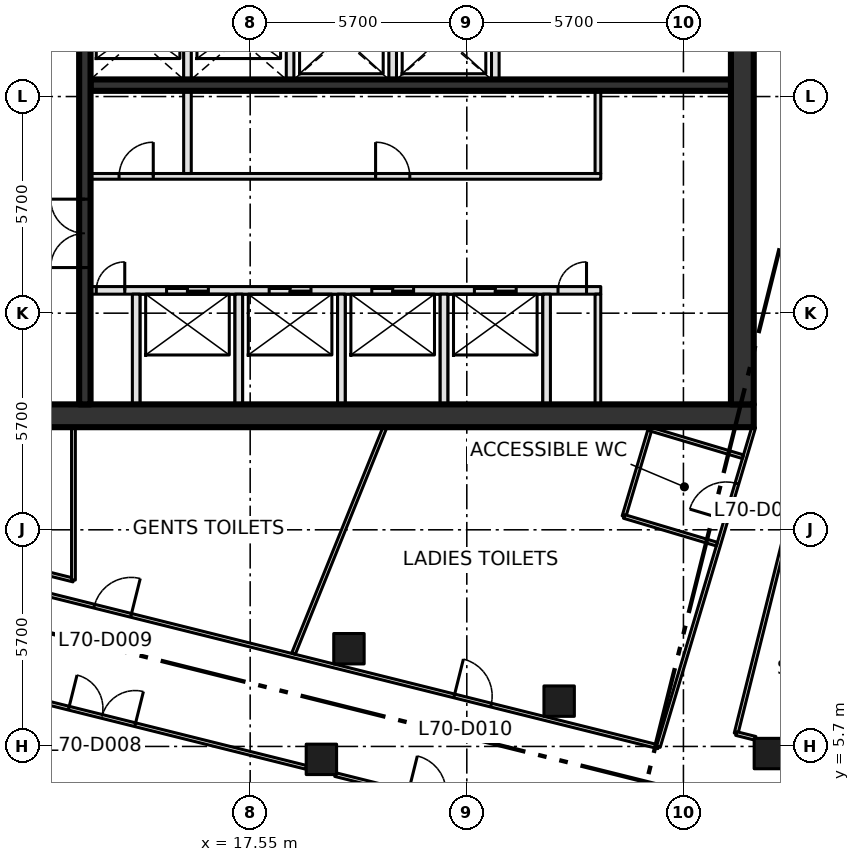
"""IFC4 building model, lengths in metres.
Left out: names, types, materials, properties, quantities, classifications, styles, units other than length and angle.
Written with IfcOpenShell. Run it as: python <this file> out.ifc"""

import sys

from ifc_helpers import new_model, si_unit, direction, frame, frame_2d, origin, origin_2d, place, context, subcontext, project, spatial, rectangle, extrude, element, fill, save


model = new_model("IFC4")
c1 = context("Model", 3, precision=1e-05, world=origin(), true_north=direction((0.0, 1.0)))
c2 = subcontext(c1, "Body", "Model", "MODEL_VIEW")
j1 = project(units=[si_unit("LENGTHUNIT", "METRE"), si_unit("PLANEANGLEUNIT", "RADIAN")], contexts=[c1])
p1 = place(None, origin())
s1 = spatial("IfcSite", under=j1, at=p1, CompositionType="ELEMENT")
p2 = place(p1, origin())
s2 = spatial("IfcBuilding", under=s1, at=p2, CompositionType="ELEMENT")
p3 = place(p2, frame((0.0, 0.0, 306.6)))
s3 = spatial("IfcBuildingStorey", under=s2, at=p3, CompositionType="ELEMENT", Elevation=306.6)
for number, where, z_axis, x_axis in (
    (1, (19.424, 5.36, 0.0), (0.0, 0.0, 1.0), (1.0, 0.0, 0.0)),
    (2, (20.149, 8.271, 0.0), (0.0, 0.0, 1.0), (1.0, 0.0, 0.0)),
    (3, (25.68, 6.892, 0.0), (0.0, 0.0, 1.0), (1.0, 0.0, 0.0)),
    (4, (31.211, 5.513, 0.0), (0.0, 0.0, 1.0), (1.0, 0.0, 0.0)),
):
    element("IfcColumn", number, at=place(p3, frame(where, z_axis=z_axis, x_axis=x_axis)), inside=s3, PredefinedType="COLUMN", context=c2, shape_type="SweptSolid", body=[
        extrude(rectangle(XDim=0.8, YDim=0.8, at=origin_2d()), origin(), (0.0, 0.0, 1.0), 4.2),
    ])
p4 = place(p3, frame((8.0, 14.4, -0.3), z_axis=(0.0, 0.0, 1.0), x_axis=(1.0, 0.0, 0.0)))
e5 = element("IfcWall", 5, at=p4, inside=s3, PredefinedType="SHEAR", context=c2, shape_type="SweptSolid", body=[
    extrude(rectangle(XDim=22.8, YDim=0.6, at=frame_2d((11.4, 0.0))), origin(), (0.0, 0.0, 1.0), 4.2),
])
p5 = place(p4, frame((2.3, 0.0, 0.3)))
e6 = element("IfcOpeningElement", 6, at=p5, cuts=e5, PredefinedType="OPENING", context=c2, shape_type="SweptSolid", body=[
    extrude(rectangle(XDim=1.8, YDim=2.1, at=frame_2d((0.9, 1.05))), frame((0.0, 0.31, 0.0), z_axis=(0.0, -1.0, 0.0), x_axis=(1.0, 0.0, 0.0)), (0.0, 0.0, 1.0), 0.62),
])
p6 = place(p3, frame((30.5, 14.7, -0.3), z_axis=(0.0, 0.0, 1.0), x_axis=(0.0, 1.0, 0.0)))
e7 = element("IfcWall", 7, at=p6, inside=s3, PredefinedType="SHEAR", context=c2, shape_type="SweptSolid", body=[
    extrude(rectangle(XDim=21.0, YDim=0.6, at=frame_2d((10.5, 0.0))), origin(), (0.0, 0.0, 1.0), 4.2),
])
p7 = place(p3, frame((13.35, 17.7, 0.0), z_axis=(0.0, 0.0, 1.0), x_axis=(1.0, 0.0, 0.0)))
e8 = element("IfcWall", 8, at=p7, inside=s3, PredefinedType="SOLIDWALL", context=c2, shape_type="SweptSolid", body=[
    extrude(rectangle(XDim=13.425, YDim=0.2, at=frame_2d((6.712, 0.0))), origin(), (0.0, 0.0, 1.0), 3.9),
])
p8 = place(p7, frame((2.0, 0.0, 0.0)))
e9 = element("IfcOpeningElement", 9, at=p8, cuts=e8, PredefinedType="OPENING", context=c2, shape_type="SweptSolid", body=[
    extrude(rectangle(XDim=1.1, YDim=2.1, at=frame_2d((0.55, 1.05))), frame((0.0, 0.11, 0.0), z_axis=(0.0, -1.0, 0.0), x_axis=(1.0, 0.0, 0.0)), (0.0, 0.0, 1.0), 0.22),
])
p9 = place(p7, frame((4.7, 0.0, 0.0)))
e10 = element("IfcOpeningElement", 10, at=p9, cuts=e8, PredefinedType="OPENING", context=c2, shape_type="SweptSolid", body=[
    extrude(rectangle(XDim=1.1, YDim=2.1, at=frame_2d((0.55, 1.05))), frame((0.0, 0.11, 0.0), z_axis=(0.0, -1.0, 0.0), x_axis=(1.0, 0.0, 0.0)), (0.0, 0.0, 1.0), 0.22),
])
p10 = place(p7, frame((7.4, 0.0, 0.0)))
e11 = element("IfcOpeningElement", 11, at=p10, cuts=e8, PredefinedType="OPENING", context=c2, shape_type="SweptSolid", body=[
    extrude(rectangle(XDim=1.1, YDim=2.1, at=frame_2d((0.55, 1.05))), frame((0.0, 0.11, 0.0), z_axis=(0.0, -1.0, 0.0), x_axis=(1.0, 0.0, 0.0)), (0.0, 0.0, 1.0), 0.22),
])
p11 = place(p7, frame((10.1, 0.0, 0.0)))
e12 = element("IfcOpeningElement", 12, at=p11, cuts=e8, PredefinedType="OPENING", context=c2, shape_type="SweptSolid", body=[
    extrude(rectangle(XDim=1.1, YDim=2.1, at=frame_2d((0.55, 1.05))), frame((0.0, 0.11, 0.0), z_axis=(0.0, -1.0, 0.0), x_axis=(1.0, 0.0, 0.0)), (0.0, 0.0, 1.0), 0.22),
])
p12 = place(p7, frame((0.15, 0.0, 0.0)))
e13 = element("IfcOpeningElement", 13, at=p12, cuts=e8, PredefinedType="OPENING", context=c2, shape_type="SweptSolid", body=[
    extrude(rectangle(XDim=0.75, YDim=2.1, at=frame_2d((0.375, 1.05))), frame((0.0, 0.11, 0.0), z_axis=(0.0, -1.0, 0.0), x_axis=(1.0, 0.0, 0.0)), (0.0, 0.0, 1.0), 0.22),
])
p13 = place(p7, frame((12.3, 0.0, 0.0)))
e14 = element("IfcOpeningElement", 14, at=p13, cuts=e8, PredefinedType="OPENING", context=c2, shape_type="SweptSolid", body=[
    extrude(rectangle(XDim=0.75, YDim=2.1, at=frame_2d((0.375, 1.05))), frame((0.0, 0.11, 0.0), z_axis=(0.0, -1.0, 0.0), x_axis=(1.0, 0.0, 0.0)), (0.0, 0.0, 1.0), 0.22),
])
p14 = place(p3, frame((13.35, 20.7, 0.0), z_axis=(0.0, 0.0, 1.0), x_axis=(1.0, 0.0, 0.0)))
e15 = element("IfcWall", 15, at=p14, inside=s3, PredefinedType="PARTITIONING", context=c2, shape_type="SweptSolid", body=[
    extrude(rectangle(XDim=13.425, YDim=0.15, at=frame_2d((6.712, 0.0))), origin(), (0.0, 0.0, 1.0), 3.9),
])
p15 = place(p14, frame((0.75, 0.0, 0.0)))
e16 = element("IfcOpeningElement", 16, at=p15, cuts=e15, PredefinedType="OPENING", context=c2, shape_type="SweptSolid", body=[
    extrude(rectangle(XDim=0.9, YDim=2.1, at=frame_2d((0.45, 1.05))), frame((0.0, 0.085, 0.0), z_axis=(0.0, -1.0, 0.0), x_axis=(1.0, 0.0, 0.0)), (0.0, 0.0, 1.0), 0.17),
])
p16 = place(p14, frame((7.5, 0.0, 0.0)))
e17 = element("IfcOpeningElement", 17, at=p16, cuts=e15, PredefinedType="OPENING", context=c2, shape_type="SweptSolid", body=[
    extrude(rectangle(XDim=0.9, YDim=2.1, at=frame_2d((0.45, 1.05))), frame((0.0, 0.085, 0.0), z_axis=(0.0, -1.0, 0.0), x_axis=(1.0, 0.0, 0.0)), (0.0, 0.0, 1.0), 0.17),
])
p17 = place(p3, frame((13.35, 23.1, 0.0), z_axis=(0.0, 0.0, 1.0), x_axis=(1.0, 0.0, 0.0)))
e18 = element("IfcWall", 18, at=p17, inside=s3, PredefinedType="SHEAR", context=c2, shape_type="SweptSolid", body=[
    extrude(rectangle(XDim=16.85, YDim=0.3, at=frame_2d((8.425, 0.0))), origin(), (0.0, 0.0, 1.0), 3.9),
])
p18 = place(p3, frame((13.2, 14.7, 0.0), z_axis=(0.0, 0.0, 1.0), x_axis=(0.0, 1.0, 0.0)))
e19 = element("IfcWall", 19, at=p18, inside=s3, PredefinedType="SHEAR", context=c2, shape_type="SweptSolid", body=[
    extrude(rectangle(XDim=21.0, YDim=0.3, at=frame_2d((10.5, 0.0))), origin(), (0.0, 0.0, 1.0), 3.9),
])
p19 = place(p18, frame((3.6, 0.0, 0.0)))
e20 = element("IfcOpeningElement", 20, at=p19, cuts=e19, PredefinedType="OPENING", context=c2, shape_type="SweptSolid", body=[
    extrude(rectangle(XDim=1.8, YDim=2.1, at=frame_2d((0.9, 1.05))), frame((0.0, 0.16, 0.0), z_axis=(0.0, -1.0, 0.0), x_axis=(1.0, 0.0, 0.0)), (0.0, 0.0, 1.0), 0.32),
])
p20 = place(p18, frame((11.7, 0.0, 0.0)))
e21 = element("IfcOpeningElement", 21, at=p20, cuts=e19, PredefinedType="OPENING", context=c2, shape_type="SweptSolid", body=[
    extrude(rectangle(XDim=1.2, YDim=2.1, at=frame_2d((0.6, 1.05))), frame((0.0, 0.16, 0.0), z_axis=(0.0, -1.0, 0.0), x_axis=(1.0, 0.0, 0.0)), (0.0, 0.0, 1.0), 0.32),
])
p21 = place(p3, frame((14.55, 14.7, 0.0), z_axis=(0.0, 0.0, 1.0), x_axis=(0.0, 1.0, 0.0)))
e22 = element("IfcWall", 22, at=p21, inside=s3, PredefinedType="SOLIDWALL", context=c2, shape_type="SweptSolid", body=[
    extrude(rectangle(XDim=2.9, YDim=0.2, at=frame_2d((1.45, 0.0))), origin(), (0.0, 0.0, 1.0), 3.9),
])
p22 = place(p3, frame((15.9, 20.775, 0.0), z_axis=(0.0, 0.0, 1.0), x_axis=(0.0, 1.0, 0.0)))
e23 = element("IfcWall", 23, at=p22, inside=s3, PredefinedType="SOLIDWALL", context=c2, shape_type="SweptSolid", body=[
    extrude(rectangle(XDim=4.625, YDim=0.2, at=frame_2d((2.312, 0.0))), origin(), (0.0, 0.0, 1.0), 3.9),
])
p23 = place(p3, frame((17.25, 14.7, 0.0), z_axis=(0.0, 0.0, 1.0), x_axis=(0.0, 1.0, 0.0)))
e24 = element("IfcWall", 24, at=p23, inside=s3, PredefinedType="SOLIDWALL", context=c2, shape_type="SweptSolid", body=[
    extrude(rectangle(XDim=2.9, YDim=0.2, at=frame_2d((1.45, 0.0))), origin(), (0.0, 0.0, 1.0), 3.9),
])
p24 = place(p3, frame((18.6, 23.25, 0.0), z_axis=(0.0, 0.0, 1.0), x_axis=(0.0, 1.0, 0.0)))
e25 = element("IfcWall", 25, at=p24, inside=s3, PredefinedType="SOLIDWALL", context=c2, shape_type="SweptSolid", body=[
    extrude(rectangle(XDim=5.15, YDim=0.2, at=frame_2d((2.575, 0.0))), origin(), (0.0, 0.0, 1.0), 3.9),
])
p25 = place(p24, frame((3.15, 0.0, 0.0)))
e26 = element("IfcOpeningElement", 26, at=p25, cuts=e25, PredefinedType="OPENING", context=c2, shape_type="SweptSolid", body=[
    extrude(rectangle(XDim=1.2, YDim=2.1, at=frame_2d((0.6, 1.05))), frame((0.0, 0.11, 0.0), z_axis=(0.0, -1.0, 0.0), x_axis=(1.0, 0.0, 0.0)), (0.0, 0.0, 1.0), 0.22),
])
p26 = place(p3, frame((19.95, 14.7, 0.0), z_axis=(0.0, 0.0, 1.0), x_axis=(0.0, 1.0, 0.0)))
e27 = element("IfcWall", 27, at=p26, inside=s3, PredefinedType="SOLIDWALL", context=c2, shape_type="SweptSolid", body=[
    extrude(rectangle(XDim=2.9, YDim=0.2, at=frame_2d((1.45, 0.0))), origin(), (0.0, 0.0, 1.0), 3.9),
])
p27 = place(p3, frame((21.3, 23.25, 0.0), z_axis=(0.0, 0.0, 1.0), x_axis=(0.0, 1.0, 0.0)))
e28 = element("IfcWall", 28, at=p27, inside=s3, PredefinedType="SOLIDWALL", context=c2, shape_type="SweptSolid", body=[
    extrude(rectangle(XDim=2.15, YDim=0.2, at=frame_2d((1.075, 0.0))), origin(), (0.0, 0.0, 1.0), 3.9),
])
p28 = place(p3, frame((22.65, 14.7, 0.0), z_axis=(0.0, 0.0, 1.0), x_axis=(0.0, 1.0, 0.0)))
e29 = element("IfcWall", 29, at=p28, inside=s3, PredefinedType="SOLIDWALL", context=c2, shape_type="SweptSolid", body=[
    extrude(rectangle(XDim=2.9, YDim=0.2, at=frame_2d((1.45, 0.0))), origin(), (0.0, 0.0, 1.0), 3.9),
])
p29 = place(p3, frame((24.0, 23.25, 0.0), z_axis=(0.0, 0.0, 1.0), x_axis=(0.0, 1.0, 0.0)))
e30 = element("IfcWall", 30, at=p29, inside=s3, PredefinedType="SOLIDWALL", context=c2, shape_type="SweptSolid", body=[
    extrude(rectangle(XDim=2.15, YDim=0.2, at=frame_2d((1.075, 0.0))), origin(), (0.0, 0.0, 1.0), 3.9),
])
p30 = place(p3, frame((25.35, 14.7, 0.0), z_axis=(0.0, 0.0, 1.0), x_axis=(0.0, 1.0, 0.0)))
e31 = element("IfcWall", 31, at=p30, inside=s3, PredefinedType="SOLIDWALL", context=c2, shape_type="SweptSolid", body=[
    extrude(rectangle(XDim=2.9, YDim=0.2, at=frame_2d((1.45, 0.0))), origin(), (0.0, 0.0, 1.0), 3.9),
])
p31 = place(p3, frame((26.7, 14.7, 0.0), z_axis=(0.0, 0.0, 1.0), x_axis=(0.0, 1.0, 0.0)))
e32 = element("IfcWall", 32, at=p31, inside=s3, PredefinedType="PARTITIONING", context=c2, shape_type="SweptSolid", body=[
    extrude(rectangle(XDim=2.9, YDim=0.15, at=frame_2d((1.45, 0.0))), origin(), (0.0, 0.0, 1.0), 3.9),
])
p32 = place(p3, frame((26.7, 20.775, 0.0), z_axis=(0.0, 0.0, 1.0), x_axis=(0.0, 1.0, 0.0)))
e33 = element("IfcWall", 33, at=p32, inside=s3, PredefinedType="PARTITIONING", context=c2, shape_type="SweptSolid", body=[
    extrude(rectangle(XDim=2.175, YDim=0.15, at=frame_2d((1.087, 0.0))), origin(), (0.0, 0.0, 1.0), 3.9),
])
p33 = place(p3, frame((8.333, 7.815, 0.0), z_axis=(0.0, 0.0, 1.0), x_axis=(0.970306508913, -0.241878644697, 0.0)))
e34 = element("IfcWall", 34, at=p33, inside=s3, PredefinedType="PARTITIONING", context=c2, shape_type="SweptSolid", body=[
    extrude(rectangle(XDim=11.018, YDim=0.1, at=frame_2d((5.509, 0.0))), origin(), (0.0, 0.0, 1.0), 3.9),
])
p34 = place(p33, frame((4.58, 0.0, 0.0)))
e35 = element("IfcOpeningElement", 35, at=p34, cuts=e34, PredefinedType="OPENING", context=c2, shape_type="SweptSolid", body=[
    extrude(rectangle(XDim=1.8, YDim=2.1, at=frame_2d((0.9, 1.05))), frame((0.0, 0.06, 0.0), z_axis=(0.0, -1.0, 0.0), x_axis=(1.0, 0.0, 0.0)), (0.0, 0.0, 1.0), 0.12),
])
p35 = place(p3, frame((9.002, 10.499, 0.0), z_axis=(0.0, 0.0, 1.0), x_axis=(0.970298340477, -0.241911410372, 0.0)))
e36 = element("IfcWall", 36, at=p35, inside=s3, PredefinedType="PARTITIONING", context=c2, shape_type="SweptSolid", body=[
    extrude(rectangle(XDim=19.88, YDim=0.1, at=frame_2d((9.94, 0.0))), origin(), (0.0, 0.0, 1.0), 3.9),
])
p36 = place(p35, frame((4.58, 0.0, 0.0)))
e37 = element("IfcOpeningElement", 37, at=p36, cuts=e36, PredefinedType="OPENING", context=c2, shape_type="SweptSolid", body=[
    extrude(rectangle(XDim=1.0, YDim=2.1, at=frame_2d((0.5, 1.05))), frame((0.0, 0.06, 0.0), z_axis=(0.0, -1.0, 0.0), x_axis=(1.0, 0.0, 0.0)), (0.0, 0.0, 1.0), 0.12),
])
p37 = place(p35, frame((14.343, 0.0, 0.0)))
e38 = element("IfcOpeningElement", 38, at=p37, cuts=e36, PredefinedType="OPENING", context=c2, shape_type="SweptSolid", body=[
    extrude(rectangle(XDim=1.0, YDim=2.1, at=frame_2d((0.5, 1.05))), frame((0.0, 0.06, 0.0), z_axis=(0.0, -1.0, 0.0), x_axis=(1.0, 0.0, 0.0)), (0.0, 0.0, 1.0), 0.12),
])
p38 = place(p3, frame((9.9, 10.826, 0.0), z_axis=(0.0, 0.0, 1.0), x_axis=(0.970290953223, -0.241941038466, 0.0)))
e39 = element("IfcWall", 39, at=p38, inside=s3, PredefinedType="PARTITIONING", context=c2, shape_type="SweptSolid", body=[
    extrude(rectangle(XDim=3.092, YDim=0.1, at=frame_2d((1.546, 0.0))), origin(), (0.0, 0.0, 1.0), 3.9),
])
p39 = place(p3, frame((12.9, 10.078, 0.0), z_axis=(0.0, 0.0, 1.0), x_axis=(0.0, 1.0, 0.0)))
e40 = element("IfcWall", 40, at=p39, inside=s3, PredefinedType="PARTITIONING", context=c2, shape_type="SweptSolid", body=[
    extrude(rectangle(XDim=4.022, YDim=0.1, at=frame_2d((2.011, 0.0))), origin(), (0.0, 0.0, 1.0), 3.9),
])
p40 = place(p3, frame((19.786, 4.96, 0.0), z_axis=(0.0, 0.0, 1.0), x_axis=(0.970335085454, -0.241763979817, 0.0)))
e41 = element("IfcWall", 41, at=p40, inside=s3, PredefinedType="PARTITIONING", context=c2, shape_type="SweptSolid", body=[
    extrude(rectangle(XDim=4.914, YDim=0.1, at=frame_2d((2.457, 0.0))), origin(), (0.0, 0.0, 1.0), 3.9),
])
p41 = place(p40, frame((1.98, 0.0, 0.0)))
e42 = element("IfcOpeningElement", 42, at=p41, cuts=e41, PredefinedType="OPENING", context=c2, shape_type="SweptSolid", body=[
    extrude(rectangle(XDim=1.0, YDim=2.1, at=frame_2d((0.5, 1.05))), frame((0.0, 0.06, 0.0), z_axis=(0.0, -1.0, 0.0), x_axis=(1.0, 0.0, 0.0)), (0.0, 0.0, 1.0), 0.12),
])
p42 = place(p3, frame((28.291, 5.69, 0.0), z_axis=(0.0, 0.0, 1.0), x_axis=(0.28588265334, 0.958264633867, 0.0)))
e43 = element("IfcWall", 43, at=p42, inside=s3, PredefinedType="PARTITIONING", context=c2, shape_type="SweptSolid", body=[
    extrude(rectangle(XDim=8.776, YDim=0.1, at=frame_2d((4.388, 0.0))), origin(), (0.0, 0.0, 1.0), 3.9),
])
p43 = place(p42, frame((6.23, 0.0, 0.0)))
e44 = element("IfcOpeningElement", 44, at=p43, cuts=e43, PredefinedType="OPENING", context=c2, shape_type="SweptSolid", body=[
    extrude(rectangle(XDim=1.0, YDim=2.1, at=frame_2d((0.5, 1.05))), frame((0.0, 0.06, 0.0), z_axis=(0.0, -1.0, 0.0), x_axis=(1.0, 0.0, 0.0)), (0.0, 0.0, 1.0), 0.12),
])
p44 = place(p3, frame((30.336, 6.04, 0.0), z_axis=(0.0, 0.0, 1.0), x_axis=(0.2420145387, 0.970272623059, 0.0)))
e45 = element("IfcWall", 45, at=p44, inside=s3, PredefinedType="PARTITIONING", context=c2, shape_type="SweptSolid", body=[
    extrude(rectangle(XDim=7.276, YDim=0.1, at=frame_2d((3.638, 0.0))), origin(), (0.0, 0.0, 1.0), 3.9),
])
p45 = place(p3, frame((30.845, 5.913, 0.0), z_axis=(0.0, 0.0, 1.0), x_axis=(-0.970279216762, 0.241988102022, 0.0)))
e46 = element("IfcWall", 46, at=p45, inside=s3, PredefinedType="PARTITIONING", context=c2, shape_type="SweptSolid", body=[
    extrude(rectangle(XDim=0.525, YDim=0.1, at=frame_2d((0.262, 0.0))), origin(), (0.0, 0.0, 1.0), 3.9),
])
p46 = place(p3, frame((18.691, 8.142, 0.0), z_axis=(0.0, 0.0, 1.0), x_axis=(0.374447972071, 0.927247925968, 0.0)))
e47 = element("IfcWall", 47, at=p46, inside=s3, PredefinedType="PARTITIONING", context=c2, shape_type="SweptSolid", body=[
    extrude(rectangle(XDim=6.426, YDim=0.1, at=frame_2d((3.213, 0.0))), origin(), (0.0, 0.0, 1.0), 3.9),
])
p47 = place(p3, frame((27.386, 11.752, 0.0), z_axis=(0.0, 0.0, 1.0), x_axis=(0.285826425332, 0.958281406781, 0.0)))
e48 = element("IfcWall", 48, at=p47, inside=s3, PredefinedType="PARTITIONING", context=c2, shape_type="SweptSolid", body=[
    extrude(rectangle(XDim=2.4, YDim=0.1, at=frame_2d((1.2, 0.0))), origin(), (0.0, 0.0, 1.0), 3.9),
])
for number, where, z_axis, x_axis in (
    (49, (28.072, 14.052, 0.0), (0.0, 0.0, 1.0), (0.958, -0.286, 0.0)),
    (50, (29.83, 11.023, 0.0), (0.0, 0.0, 1.0), (-0.958, 0.286, 0.0)),
):
    element("IfcWall", number, at=place(p3, frame(where, z_axis=z_axis, x_axis=x_axis)), inside=s3, PredefinedType="PARTITIONING", context=c2, shape_type="SweptSolid", body=[
        extrude(rectangle(XDim=2.551, YDim=0.1, at=frame_2d((1.275, 0.0))), origin(), (0.0, 0.0, 1.0), 3.9),
    ])
p48 = place(p8, origin())
e51 = element("IfcDoor", 51, at=p48, inside=s3, OperationType="SLIDING_TO_LEFT", PredefinedType="DOOR", context=c2, shape_type="SweptSolid", body=[
    extrude(rectangle(XDim=1.1, YDim=2.1, at=frame_2d((0.55, 1.05))), frame((0.0, 0.025, 0.0), z_axis=(0.0, -1.0, 0.0), x_axis=(1.0, 0.0, 0.0)), (0.0, 0.0, 1.0), 0.05),
])
fill(e9, e51)
p49 = place(p9, origin())
e52 = element("IfcDoor", 52, at=p49, inside=s3, OperationType="SLIDING_TO_LEFT", PredefinedType="DOOR", context=c2, shape_type="SweptSolid", body=[
    extrude(rectangle(XDim=1.1, YDim=2.1, at=frame_2d((0.55, 1.05))), frame((0.0, 0.025, 0.0), z_axis=(0.0, -1.0, 0.0), x_axis=(1.0, 0.0, 0.0)), (0.0, 0.0, 1.0), 0.05),
])
fill(e10, e52)
p50 = place(p10, origin())
e53 = element("IfcDoor", 53, at=p50, inside=s3, OperationType="SLIDING_TO_LEFT", PredefinedType="DOOR", context=c2, shape_type="SweptSolid", body=[
    extrude(rectangle(XDim=1.1, YDim=2.1, at=frame_2d((0.55, 1.05))), frame((0.0, 0.025, 0.0), z_axis=(0.0, -1.0, 0.0), x_axis=(1.0, 0.0, 0.0)), (0.0, 0.0, 1.0), 0.05),
])
fill(e11, e53)
p51 = place(p11, origin())
e54 = element("IfcDoor", 54, at=p51, inside=s3, OperationType="SLIDING_TO_LEFT", PredefinedType="DOOR", context=c2, shape_type="SweptSolid", body=[
    extrude(rectangle(XDim=1.1, YDim=2.1, at=frame_2d((0.55, 1.05))), frame((0.0, 0.025, 0.0), z_axis=(0.0, -1.0, 0.0), x_axis=(1.0, 0.0, 0.0)), (0.0, 0.0, 1.0), 0.05),
])
fill(e12, e54)
p52 = place(p12, origin())
e55 = element("IfcDoor", 55, at=p52, inside=s3, OperationType="SINGLE_SWING_RIGHT", PredefinedType="DOOR", context=c2, shape_type="SweptSolid", body=[
    extrude(rectangle(XDim=0.75, YDim=2.1, at=frame_2d((0.375, 1.05))), frame((0.0, 0.025, 0.0), z_axis=(0.0, -1.0, 0.0), x_axis=(1.0, 0.0, 0.0)), (0.0, 0.0, 1.0), 0.05),
])
fill(e13, e55)
p53 = place(p13, origin())
e56 = element("IfcDoor", 56, at=p53, inside=s3, OperationType="SINGLE_SWING_RIGHT", PredefinedType="DOOR", context=c2, shape_type="SweptSolid", body=[
    extrude(rectangle(XDim=0.75, YDim=2.1, at=frame_2d((0.375, 1.05))), frame((0.0, 0.025, 0.0), z_axis=(0.0, -1.0, 0.0), x_axis=(1.0, 0.0, 0.0)), (0.0, 0.0, 1.0), 0.05),
])
fill(e14, e56)
p54 = place(p15, origin())
e57 = element("IfcDoor", 57, at=p54, inside=s3, OperationType="SINGLE_SWING_RIGHT", PredefinedType="DOOR", context=c2, shape_type="SweptSolid", body=[
    extrude(rectangle(XDim=0.9, YDim=2.1, at=frame_2d((0.45, 1.05))), frame((0.0, 0.025, 0.0), z_axis=(0.0, -1.0, 0.0), x_axis=(1.0, 0.0, 0.0)), (0.0, 0.0, 1.0), 0.05),
])
fill(e16, e57)
p55 = place(p16, origin())
e58 = element("IfcDoor", 58, at=p55, inside=s3, OperationType="SINGLE_SWING_LEFT", PredefinedType="DOOR", context=c2, shape_type="SweptSolid", body=[
    extrude(rectangle(XDim=0.9, YDim=2.1, at=frame_2d((0.45, 1.05))), frame((0.0, 0.025, 0.0), z_axis=(0.0, -1.0, 0.0), x_axis=(1.0, 0.0, 0.0)), (0.0, 0.0, 1.0), 0.05),
])
fill(e17, e58)
p56 = place(p19, origin())
e59 = element("IfcDoor", 59, at=p56, inside=s3, OperationType="DOUBLE_DOOR_SINGLE_SWING", PredefinedType="DOOR", context=c2, shape_type="SweptSolid", body=[
    extrude(rectangle(XDim=1.8, YDim=2.1, at=frame_2d((0.9, 1.05))), frame((0.0, 0.025, 0.0), z_axis=(0.0, -1.0, 0.0), x_axis=(1.0, 0.0, 0.0)), (0.0, 0.0, 1.0), 0.05),
])
fill(e20, e59)
p57 = place(p34, origin())
e60 = element("IfcDoor", 60, at=p57, inside=s3, OperationType="DOUBLE_DOOR_SINGLE_SWING", PredefinedType="DOOR", context=c2, shape_type="SweptSolid", body=[
    extrude(rectangle(XDim=1.8, YDim=2.1, at=frame_2d((0.9, 1.05))), frame((0.0, 0.025, 0.0), z_axis=(0.0, -1.0, 0.0), x_axis=(1.0, 0.0, 0.0)), (0.0, 0.0, 1.0), 0.05),
])
fill(e35, e60)
p58 = place(p36, origin())
e61 = element("IfcDoor", 61, at=p58, inside=s3, OperationType="SINGLE_SWING_RIGHT", PredefinedType="DOOR", context=c2, shape_type="SweptSolid", body=[
    extrude(rectangle(XDim=1.0, YDim=2.1, at=frame_2d((0.5, 1.05))), frame((0.0, 0.025, 0.0), z_axis=(0.0, -1.0, 0.0), x_axis=(1.0, 0.0, 0.0)), (0.0, 0.0, 1.0), 0.05),
])
fill(e37, e61)
p59 = place(p37, origin())
e62 = element("IfcDoor", 62, at=p59, inside=s3, OperationType="SINGLE_SWING_LEFT", PredefinedType="DOOR", context=c2, shape_type="SweptSolid", body=[
    extrude(rectangle(XDim=1.0, YDim=2.1, at=frame_2d((0.5, 1.05))), frame((0.0, 0.025, 0.0), z_axis=(0.0, -1.0, 0.0), x_axis=(1.0, 0.0, 0.0)), (0.0, 0.0, 1.0), 0.05),
])
fill(e38, e62)
p60 = place(p43, origin())
e63 = element("IfcDoor", 63, at=p60, inside=s3, OperationType="SINGLE_SWING_LEFT", PredefinedType="DOOR", context=c2, shape_type="SweptSolid", body=[
    extrude(rectangle(XDim=1.0, YDim=2.1, at=frame_2d((0.5, 1.05))), frame((0.0, 0.025, 0.0), z_axis=(0.0, -1.0, 0.0), x_axis=(1.0, 0.0, 0.0)), (0.0, 0.0, 1.0), 0.05),
])
fill(e44, e63)
save(model, sys.argv[1])
